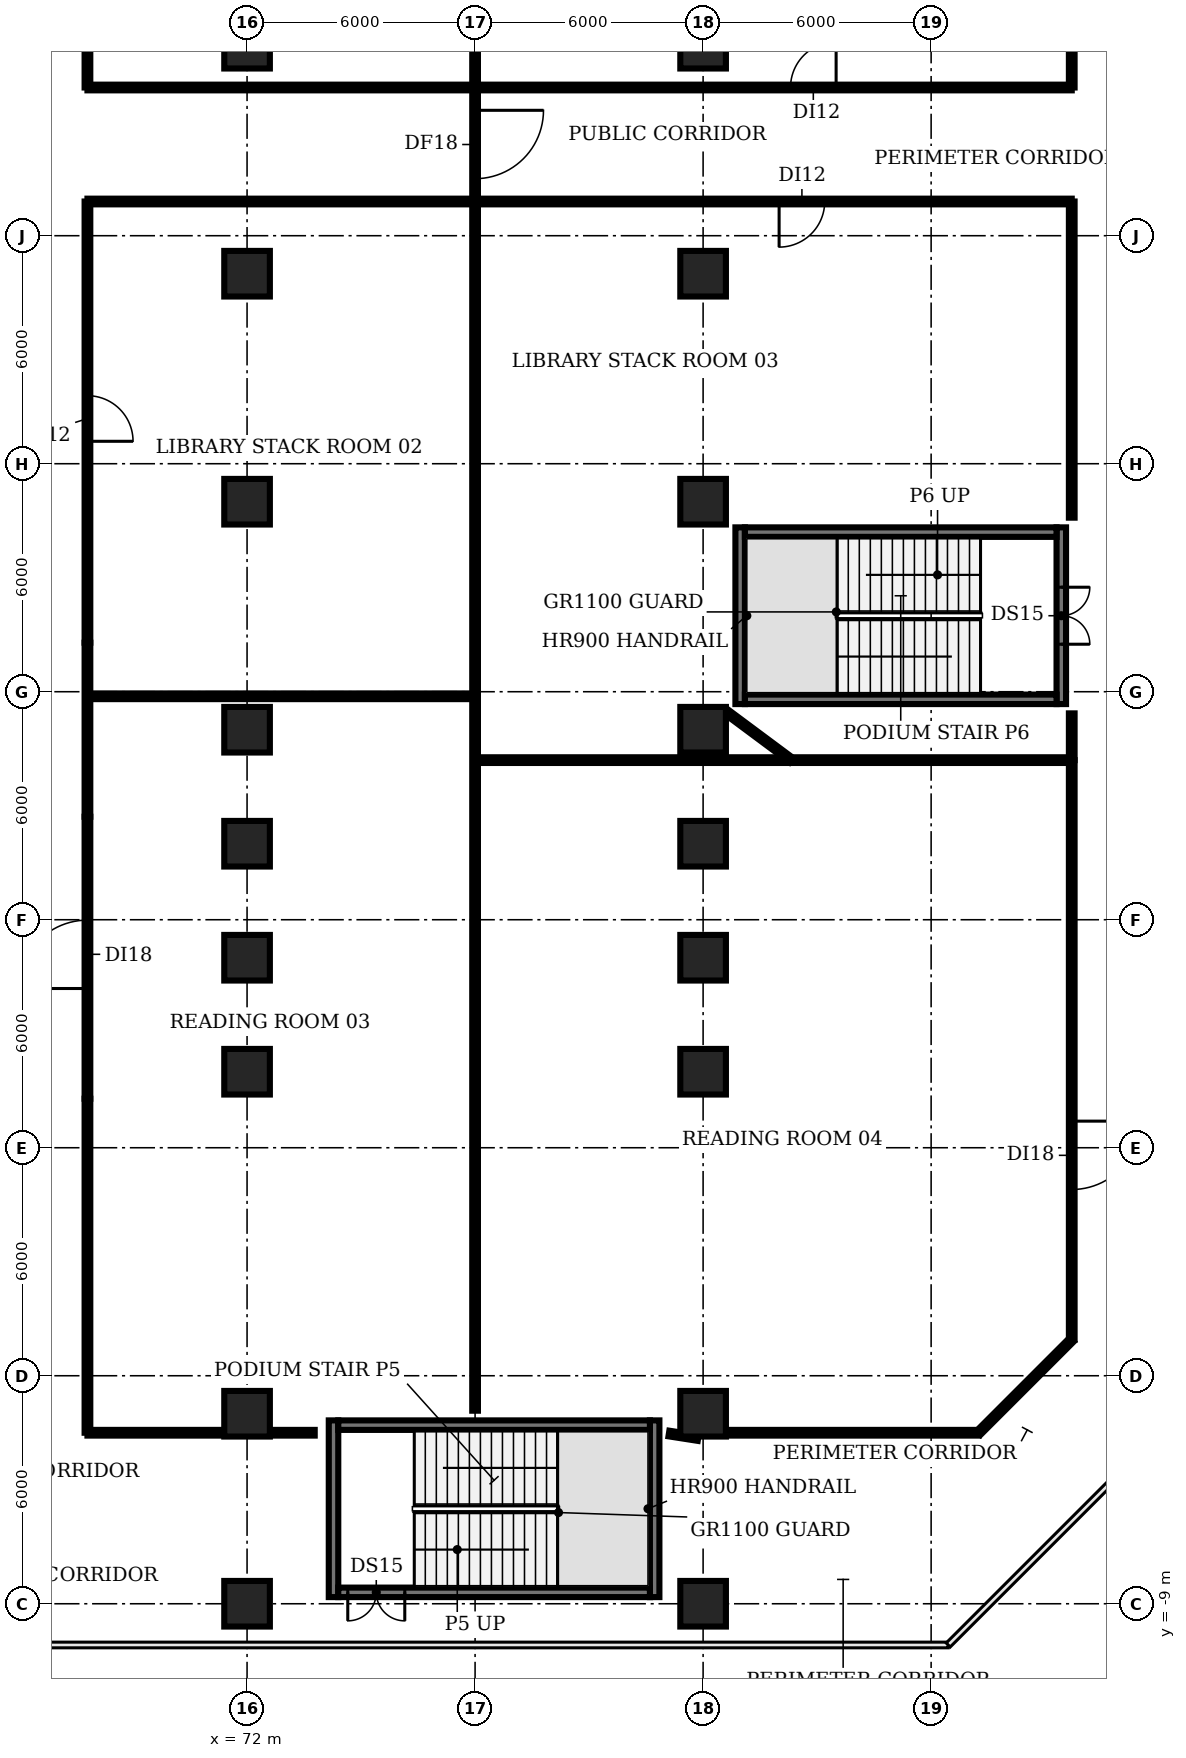
"""IFC4 building model, lengths in metres.
Left out: names, types, materials, properties, quantities, classifications, styles, units other than length and angle.
Written with IfcOpenShell. Run it as: python <this file> out.ifc"""

import sys

from ifc_helpers import new_model, si_unit, direction, frame, frame_2d, origin, origin_2d, place, context, subcontext, project, spatial, rectangle, extrude, element, fill, save


model = new_model("IFC4")
c1 = context("Model", 3, precision=1e-05, world=origin(), true_north=direction((0.0, 1.0)))
c2 = subcontext(c1, "Body", "Model", "MODEL_VIEW")
j1 = project(units=[si_unit("LENGTHUNIT", "METRE"), si_unit("PLANEANGLEUNIT", "RADIAN")], contexts=[c1])
p1 = place(None, origin())
s1 = spatial("IfcSite", under=j1, at=p1, CompositionType="ELEMENT")
p2 = place(p1, origin())
s2 = spatial("IfcBuilding", under=s1, at=p2, CompositionType="ELEMENT")
p3 = place(p2, frame((0.0, 0.0, 6.0)))
s3 = spatial("IfcBuildingStorey", under=s2, at=p3, CompositionType="ELEMENT", Elevation=6.0)
for number, where, z_axis, x_axis in (
    (1, (72.0, -9.0, 0.0), (0.0, 0.0, 1.0), (1.0, 0.0, 0.0)),
    (2, (72.0, -4.0, 0.0), (0.0, 0.0, 1.0), (1.0, 0.0, 0.0)),
    (3, (72.0, 5.0, 0.0), (0.0, 0.0, 1.0), (1.0, 0.0, 0.0)),
    (4, (72.0, 8.0, 0.0), (0.0, 0.0, 1.0), (1.0, 0.0, 0.0)),
    (5, (72.0, 11.0, 0.0), (0.0, 0.0, 1.0), (1.0, 0.0, 0.0)),
    (6, (72.0, 14.0, 0.0), (0.0, 0.0, 1.0), (1.0, 0.0, 0.0)),
    (7, (72.0, 20.0, 0.0), (0.0, 0.0, 1.0), (1.0, 0.0, 0.0)),
    (8, (72.0, 26.0, 0.0), (0.0, 0.0, 1.0), (1.0, 0.0, 0.0)),
    (9, (72.0, 32.0, 0.0), (0.0, 0.0, 1.0), (1.0, 0.0, 0.0)),
    (10, (84.0, -9.0, 0.0), (0.0, 0.0, 1.0), (1.0, 0.0, 0.0)),
    (11, (84.0, -4.0, 0.0), (0.0, 0.0, 1.0), (1.0, 0.0, 0.0)),
    (12, (84.0, 5.0, 0.0), (0.0, 0.0, 1.0), (1.0, 0.0, 0.0)),
    (13, (84.0, 8.0, 0.0), (0.0, 0.0, 1.0), (1.0, 0.0, 0.0)),
    (14, (84.0, 11.0, 0.0), (0.0, 0.0, 1.0), (1.0, 0.0, 0.0)),
    (15, (84.0, 14.0, 0.0), (0.0, 0.0, 1.0), (1.0, 0.0, 0.0)),
    (16, (84.0, 20.0, 0.0), (0.0, 0.0, 1.0), (1.0, 0.0, 0.0)),
    (17, (84.0, 26.0, 0.0), (0.0, 0.0, 1.0), (1.0, 0.0, 0.0)),
    (18, (84.0, 32.0, 0.0), (0.0, 0.0, 1.0), (1.0, 0.0, 0.0)),
):
    element("IfcColumn", number, at=place(p3, frame(where, z_axis=z_axis, x_axis=x_axis)), inside=s3, PredefinedType="COLUMN", context=c2, shape_type="SweptSolid", body=[
        extrude(rectangle(XDim=1.2, YDim=1.2, at=origin_2d()), origin(), (0.0, 0.0, 1.0), 4.6),
    ])
for number, where, z_axis, x_axis in (
    (19, (74.275, -8.825, 0.0), (0.0, 0.0, 1.0), (0.0, 1.0, 0.0)),
    (20, (82.725, -8.825, 0.0), (0.0, 0.0, 1.0), (0.0, 1.0, 0.0)),
):
    element("IfcWall", number, at=place(p3, frame(where, z_axis=z_axis, x_axis=x_axis)), inside=s3, PredefinedType="SHEAR", context=c2, shape_type="SweptSolid", body=[
        extrude(rectangle(XDim=4.65, YDim=0.25, at=frame_2d((2.325, 0.0))), origin(), (0.0, 0.0, 1.0), 4.6),
    ])
p4 = place(p3, frame((82.6, -8.7, 0.0), z_axis=(0.0, 0.0, 1.0), x_axis=(-1.0, 0.0, 0.0)))
e21 = element("IfcWall", 21, at=p4, inside=s3, PredefinedType="SHEAR", context=c2, shape_type="SweptSolid", body=[
    extrude(rectangle(XDim=8.2, YDim=0.25, at=frame_2d((4.1, 0.0))), origin(), (0.0, 0.0, 1.0), 4.6),
])
p5 = place(p4, frame((6.45, 0.0, 0.0)))
e22 = element("IfcOpeningElement", 22, at=p5, cuts=e21, PredefinedType="OPENING", context=c2, shape_type="SweptSolid", body=[
    extrude(rectangle(XDim=1.5, YDim=2.1, at=frame_2d((0.75, 1.05))), frame((0.0, 0.135, 0.0), z_axis=(0.0, -1.0, 0.0), x_axis=(1.0, 0.0, 0.0)), (0.0, 0.0, 1.0), 0.27),
])
p6 = place(p3, frame((74.4, -4.3, 0.0), z_axis=(0.0, 0.0, 1.0), x_axis=(1.0, 0.0, 0.0)))
e23 = element("IfcWall", 23, at=p6, inside=s3, PredefinedType="SHEAR", context=c2, shape_type="SweptSolid", body=[
    extrude(rectangle(XDim=8.2, YDim=0.25, at=frame_2d((4.1, 0.0))), origin(), (0.0, 0.0, 1.0), 4.6),
])
p7 = place(p3, frame((84.975, 14.675, 0.0), z_axis=(0.0, 0.0, 1.0), x_axis=(0.0, 1.0, 0.0)))
e24 = element("IfcWall", 24, at=p7, inside=s3, PredefinedType="SHEAR", context=c2, shape_type="SweptSolid", body=[
    extrude(rectangle(XDim=4.65, YDim=0.25, at=frame_2d((2.325, 0.0))), origin(), (0.0, 0.0, 1.0), 4.6),
])
p8 = place(p3, frame((93.425, 19.325, 0.0), z_axis=(0.0, 0.0, 1.0), x_axis=(0.0, -1.0, 0.0)))
e25 = element("IfcWall", 25, at=p8, inside=s3, PredefinedType="SHEAR", context=c2, shape_type="SweptSolid", body=[
    extrude(rectangle(XDim=4.65, YDim=0.25, at=frame_2d((2.325, 0.0))), origin(), (0.0, 0.0, 1.0), 4.6),
])
p9 = place(p8, frame((1.575, 0.0, 0.0)))
e26 = element("IfcOpeningElement", 26, at=p9, cuts=e25, PredefinedType="OPENING", context=c2, shape_type="SweptSolid", body=[
    extrude(rectangle(XDim=1.5, YDim=2.1, at=frame_2d((0.75, 1.05))), frame((0.0, 0.135, 0.0), z_axis=(0.0, -1.0, 0.0), x_axis=(1.0, 0.0, 0.0)), (0.0, 0.0, 1.0), 0.27),
])
for number, where, z_axis, x_axis in (
    (27, (85.1, 14.8, 0.0), (0.0, 0.0, 1.0), (1.0, 0.0, 0.0)),
    (28, (85.1, 19.2, 0.0), (0.0, 0.0, 1.0), (1.0, 0.0, 0.0)),
):
    element("IfcWall", number, at=place(p3, frame(where, z_axis=z_axis, x_axis=x_axis)), inside=s3, PredefinedType="SHEAR", context=c2, shape_type="SweptSolid", body=[
        extrude(rectangle(XDim=8.2, YDim=0.25, at=frame_2d((4.1, 0.0))), origin(), (0.0, 0.0, 1.0), 4.6),
    ])
p10 = place(p3, frame((67.8, -4.5, 0.0), z_axis=(0.0, 0.0, 1.0), x_axis=(0.0, 1.0, 0.0)))
e29 = element("IfcWall", 29, at=p10, inside=s3, PredefinedType="PARTITIONING", context=c2, shape_type="SweptSolid", body=[
    extrude(rectangle(XDim=8.79, YDim=0.15, at=frame_2d((4.395, 0.0))), origin(), (0.0, 0.0, 1.0), 3.18),
])
p11 = place(p3, frame((67.8, -4.5, 0.0), z_axis=(0.0, 0.0, 1.0), x_axis=(1.0, 0.0, 0.0)))
e30 = element("IfcWall", 30, at=p11, inside=s3, PredefinedType="PARTITIONING", context=c2, shape_type="SweptSolid", body=[
    extrude(rectangle(XDim=3.74, YDim=0.15, at=frame_2d((1.87, 0.0))), origin(), (0.0, 0.0, 1.0), 3.18),
])
p12 = place(p3, frame((67.8, 4.29, 0.0), z_axis=(0.0, 0.0, 1.0), x_axis=(0.0, 1.0, 0.0)))
e31 = element("IfcWall", 31, at=p12, inside=s3, PredefinedType="PARTITIONING", context=c2, shape_type="SweptSolid", body=[
    extrude(rectangle(XDim=7.42, YDim=0.15, at=frame_2d((3.71, 0.0))), origin(), (0.0, 0.0, 1.0), 3.18),
])
p13 = place(p12, frame((2.9, 0.0, 0.0)))
e32 = element("IfcOpeningElement", 32, at=p13, cuts=e31, PredefinedType="OPENING", context=c2, shape_type="SweptSolid", body=[
    extrude(rectangle(XDim=1.8, YDim=2.1, at=frame_2d((0.9, 1.05))), frame((0.0, 0.085, 0.0), z_axis=(0.0, -1.0, 0.0), x_axis=(1.0, 0.0, 0.0)), (0.0, 0.0, 1.0), 0.17),
])
p14 = place(p3, frame((67.8, 11.71, 0.0), z_axis=(0.0, 0.0, 1.0), x_axis=(0.0, 1.0, 0.0)))
e33 = element("IfcWall", 33, at=p14, inside=s3, PredefinedType="PARTITIONING", context=c2, shape_type="SweptSolid", body=[
    extrude(rectangle(XDim=4.58, YDim=0.15, at=frame_2d((2.29, 0.0))), origin(), (0.0, 0.0, 1.0), 3.18),
])
p15 = place(p3, frame((67.8, 14.88, 0.0), z_axis=(0.0, 0.0, 1.0), x_axis=(1.0, 0.0, 0.0)))
e34 = element("IfcWall", 34, at=p15, inside=s3, PredefinedType="PARTITIONING", context=c2, shape_type="SweptSolid", body=[
    extrude(rectangle(XDim=10.2, YDim=0.15, at=frame_2d((5.1, 0.0))), origin(), (0.0, 0.0, 1.0), 3.18),
])
p16 = place(p3, frame((67.8, 27.9, 0.0), z_axis=(0.0, 0.0, 1.0), x_axis=(0.0, -1.0, 0.0)))
e35 = element("IfcWall", 35, at=p16, inside=s3, PredefinedType="PARTITIONING", context=c2, shape_type="SweptSolid", body=[
    extrude(rectangle(XDim=11.61, YDim=0.15, at=frame_2d((5.805, 0.0))), origin(), (0.0, 0.0, 1.0), 3.18),
])
p17 = place(p16, frame((5.11, 0.0, 0.0)))
e36 = element("IfcOpeningElement", 36, at=p17, cuts=e35, PredefinedType="OPENING", context=c2, shape_type="SweptSolid", body=[
    extrude(rectangle(XDim=1.2, YDim=2.1, at=frame_2d((0.6, 1.05))), frame((0.0, 0.085, 0.0), z_axis=(0.0, -1.0, 0.0), x_axis=(1.0, 0.0, 0.0)), (0.0, 0.0, 1.0), 0.17),
])
p18 = place(p3, frame((67.8, 27.9, 0.0), z_axis=(0.0, 0.0, 1.0), x_axis=(1.0, 0.0, 0.0)))
e37 = element("IfcWall", 37, at=p18, inside=s3, PredefinedType="PARTITIONING", context=c2, shape_type="SweptSolid", body=[
    extrude(rectangle(XDim=10.2, YDim=0.15, at=frame_2d((5.1, 0.0))), origin(), (0.0, 0.0, 1.0), 3.18),
])
p19 = place(p3, frame((67.8, 30.9, 0.0), z_axis=(0.0, 0.0, 1.0), x_axis=(0.0, 1.0, 0.0)))
e38 = element("IfcWall", 38, at=p19, inside=s3, PredefinedType="PARTITIONING", context=c2, shape_type="SweptSolid", body=[
    extrude(rectangle(XDim=23.87, YDim=0.15, at=frame_2d((11.935, 0.0))), origin(), (0.0, 0.0, 1.0), 3.18),
])
p20 = place(p19, frame((11.0, 0.0, 0.0)))
e39 = element("IfcOpeningElement", 39, at=p20, cuts=e38, PredefinedType="OPENING", context=c2, shape_type="SweptSolid", body=[
    extrude(rectangle(XDim=1.8, YDim=2.1, at=frame_2d((0.9, 1.05))), frame((0.0, 0.085, 0.0), z_axis=(0.0, -1.0, 0.0), x_axis=(1.0, 0.0, 0.0)), (0.0, 0.0, 1.0), 0.17),
])
p21 = place(p3, frame((67.8, 30.9, 0.0), z_axis=(0.0, 0.0, 1.0), x_axis=(1.0, 0.0, 0.0)))
e40 = element("IfcWall", 40, at=p21, inside=s3, PredefinedType="PARTITIONING", context=c2, shape_type="SweptSolid", body=[
    extrude(rectangle(XDim=10.2, YDim=0.15, at=frame_2d((5.1, 0.0))), origin(), (0.0, 0.0, 1.0), 3.18),
])
p22 = place(p3, frame((72.46, -4.5, 0.0), z_axis=(0.0, 0.0, 1.0), x_axis=(1.0, 0.0, 0.0)))
e41 = element("IfcWall", 41, at=p22, inside=s3, PredefinedType="PARTITIONING", context=c2, shape_type="SweptSolid", body=[
    extrude(rectangle(XDim=1.32, YDim=0.15, at=frame_2d((0.66, 0.0))), origin(), (0.0, 0.0, 1.0), 3.18),
])
p23 = place(p3, frame((78.0, -3.92, 0.0), z_axis=(0.0, 0.0, 1.0), x_axis=(0.0, 1.0, 0.0)))
e42 = element("IfcWall", 42, at=p23, inside=s3, PredefinedType="PARTITIONING", context=c2, shape_type="SweptSolid", body=[
    extrude(rectangle(XDim=31.82, YDim=0.15, at=frame_2d((15.91, 0.0))), origin(), (0.0, 0.0, 1.0), 3.18),
])
p24 = place(p3, frame((78.0, 13.2, 0.0), z_axis=(0.0, 0.0, 1.0), x_axis=(1.0, 0.0, 0.0)))
e43 = element("IfcWall", 43, at=p24, inside=s3, PredefinedType="PARTITIONING", context=c2, shape_type="SweptSolid", body=[
    extrude(rectangle(XDim=15.7, YDim=0.15, at=frame_2d((7.85, 0.0))), origin(), (0.0, 0.0, 1.0), 3.18),
])
p25 = place(p3, frame((78.0, 30.9, 0.0), z_axis=(0.0, 0.0, 1.0), x_axis=(0.0, -1.0, 0.0)))
e44 = element("IfcWall", 44, at=p25, inside=s3, PredefinedType="PARTITIONING", context=c2, shape_type="SweptSolid", body=[
    extrude(rectangle(XDim=3.0, YDim=0.15, at=frame_2d((1.5, 0.0))), origin(), (0.0, 0.0, 1.0), 3.18),
])
p26 = place(p25, frame((0.6, 0.0, 0.0)))
e45 = element("IfcOpeningElement", 45, at=p26, cuts=e44, PredefinedType="OPENING", context=c2, shape_type="SweptSolid", body=[
    extrude(rectangle(XDim=1.8, YDim=2.1, at=frame_2d((0.9, 1.05))), frame((0.0, 0.085, 0.0), z_axis=(0.0, -1.0, 0.0), x_axis=(1.0, 0.0, 0.0)), (0.0, 0.0, 1.0), 0.17),
])
p27 = place(p3, frame((78.0, 30.9, 0.0), z_axis=(0.0, 0.0, 1.0), x_axis=(0.0, 1.0, 0.0)))
e46 = element("IfcWall", 46, at=p27, inside=s3, PredefinedType="PARTITIONING", context=c2, shape_type="SweptSolid", body=[
    extrude(rectangle(XDim=35.8, YDim=0.15, at=frame_2d((17.9, 0.0))), origin(), (0.0, 0.0, 1.0), 3.18),
])
p28 = place(p3, frame((78.0, 30.9, 0.0), z_axis=(0.0, 0.0, 1.0), x_axis=(1.0, 0.0, 0.0)))
e47 = element("IfcWall", 47, at=p28, inside=s3, PredefinedType="PARTITIONING", context=c2, shape_type="SweptSolid", body=[
    extrude(rectangle(XDim=15.7, YDim=0.15, at=frame_2d((7.85, 0.0))), origin(), (0.0, 0.0, 1.0), 3.18),
])
p29 = place(p28, frame((8.3, 0.0, 0.0)))
e48 = element("IfcOpeningElement", 48, at=p29, cuts=e47, PredefinedType="OPENING", context=c2, shape_type="SweptSolid", body=[
    extrude(rectangle(XDim=1.2, YDim=2.1, at=frame_2d((0.6, 1.05))), frame((0.0, 0.085, 0.0), z_axis=(0.0, -1.0, 0.0), x_axis=(1.0, 0.0, 0.0)), (0.0, 0.0, 1.0), 0.17),
])
p30 = place(p3, frame((83.1, -4.52, 0.0), z_axis=(0.0, 0.0, 1.0), x_axis=(0.988098486873, -0.153822560892, 0.0)))
e49 = element("IfcWall", 49, at=p30, inside=s3, PredefinedType="PARTITIONING", context=c2, shape_type="SweptSolid", body=[
    extrude(rectangle(XDim=0.779, YDim=0.15, at=frame_2d((0.39, 0.0))), origin(), (0.0, 0.0, 1.0), 3.18),
])
p31 = place(p3, frame((84.46, -4.5, 0.0), z_axis=(0.0, 0.0, 1.0), x_axis=(1.0, 0.0, 0.0)))
e50 = element("IfcWall", 50, at=p31, inside=s3, PredefinedType="PARTITIONING", context=c2, shape_type="SweptSolid", body=[
    extrude(rectangle(XDim=6.79, YDim=0.15, at=frame_2d((3.395, 0.0))), origin(), (0.0, 0.0, 1.0), 3.18),
])
p32 = place(p3, frame((84.64, 14.45, 0.0), z_axis=(0.0, 0.0, 1.0), x_axis=(0.802316318144, -0.596899091673, 0.0)))
e51 = element("IfcWall", 51, at=p32, inside=s3, PredefinedType="PARTITIONING", context=c2, shape_type="SweptSolid", body=[
    extrude(rectangle(XDim=2.094, YDim=0.15, at=frame_2d((1.047, 0.0))), origin(), (0.0, 0.0, 1.0), 3.18),
])
p33 = place(p3, frame((91.25, -4.5, 0.0), z_axis=(0.0, 0.0, 1.0), x_axis=(0.707106781187, 0.707106781187, 0.0)))
e52 = element("IfcWall", 52, at=p33, inside=s3, PredefinedType="PARTITIONING", context=c2, shape_type="SweptSolid", body=[
    extrude(rectangle(XDim=3.465, YDim=0.15, at=frame_2d((1.732, 0.0))), origin(), (0.0, 0.0, 1.0), 3.18),
])
p34 = place(p3, frame((93.7, 13.2, 0.0), z_axis=(0.0, 0.0, 1.0), x_axis=(0.0, -1.0, 0.0)))
e53 = element("IfcWall", 53, at=p34, inside=s3, PredefinedType="PARTITIONING", context=c2, shape_type="SweptSolid", body=[
    extrude(rectangle(XDim=15.25, YDim=0.15, at=frame_2d((7.625, 0.0))), origin(), (0.0, 0.0, 1.0), 3.18),
])
p35 = place(p34, frame((9.5, 0.0, 0.0)))
e54 = element("IfcOpeningElement", 54, at=p35, cuts=e53, PredefinedType="OPENING", context=c2, shape_type="SweptSolid", body=[
    extrude(rectangle(XDim=1.8, YDim=2.1, at=frame_2d((0.9, 1.05))), frame((0.0, 0.085, 0.0), z_axis=(0.0, -1.0, 0.0), x_axis=(1.0, 0.0, 0.0)), (0.0, 0.0, 1.0), 0.17),
])
p36 = place(p3, frame((93.7, 13.2, 0.0), z_axis=(0.0, 0.0, 1.0), x_axis=(0.0, 1.0, 0.0)))
e55 = element("IfcWall", 55, at=p36, inside=s3, PredefinedType="PARTITIONING", context=c2, shape_type="SweptSolid", body=[
    extrude(rectangle(XDim=1.23, YDim=0.15, at=frame_2d((0.615, 0.0))), origin(), (0.0, 0.0, 1.0), 3.18),
])
p37 = place(p3, frame((93.7, 19.58, 0.0), z_axis=(0.0, 0.0, 1.0), x_axis=(0.0, 1.0, 0.0)))
e56 = element("IfcWall", 56, at=p37, inside=s3, PredefinedType="PARTITIONING", context=c2, shape_type="SweptSolid", body=[
    extrude(rectangle(XDim=8.32, YDim=0.15, at=frame_2d((4.16, 0.0))), origin(), (0.0, 0.0, 1.0), 3.18),
])
p38 = place(p3, frame((93.7, 27.9, 0.0), z_axis=(0.0, 0.0, 1.0), x_axis=(-1.0, 0.0, 0.0)))
e57 = element("IfcWall", 57, at=p38, inside=s3, PredefinedType="PARTITIONING", context=c2, shape_type="SweptSolid", body=[
    extrude(rectangle(XDim=15.7, YDim=0.15, at=frame_2d((7.85, 0.0))), origin(), (0.0, 0.0, 1.0), 3.18),
])
p39 = place(p38, frame((6.5, 0.0, 0.0)))
e58 = element("IfcOpeningElement", 58, at=p39, cuts=e57, PredefinedType="OPENING", context=c2, shape_type="SweptSolid", body=[
    extrude(rectangle(XDim=1.2, YDim=2.1, at=frame_2d((0.6, 1.05))), frame((0.0, 0.085, 0.0), z_axis=(0.0, -1.0, 0.0), x_axis=(1.0, 0.0, 0.0)), (0.0, 0.0, 1.0), 0.17),
])
p40 = place(p3, frame((93.7, 30.9, 0.0), z_axis=(0.0, 0.0, 1.0), x_axis=(0.0, 1.0, 0.0)))
e59 = element("IfcWall", 59, at=p40, inside=s3, PredefinedType="PARTITIONING", context=c2, shape_type="SweptSolid", body=[
    extrude(rectangle(XDim=7.52, YDim=0.15, at=frame_2d((3.76, 0.0))), origin(), (0.0, 0.0, 1.0), 3.18),
])
p41 = place(p5, origin())
e60 = element("IfcDoor", 60, at=p41, inside=s3, OperationType="DOUBLE_DOOR_SINGLE_SWING", PredefinedType="DOOR", context=c2, shape_type="SweptSolid", body=[
    extrude(rectangle(XDim=1.5, YDim=2.1, at=frame_2d((0.75, 1.05))), frame((0.0, 0.025, 0.0), z_axis=(0.0, -1.0, 0.0), x_axis=(1.0, 0.0, 0.0)), (0.0, 0.0, 1.0), 0.05),
])
fill(e22, e60)
p42 = place(p9, origin())
e61 = element("IfcDoor", 61, at=p42, inside=s3, OperationType="DOUBLE_DOOR_SINGLE_SWING", PredefinedType="DOOR", context=c2, shape_type="SweptSolid", body=[
    extrude(rectangle(XDim=1.5, YDim=2.1, at=frame_2d((0.75, 1.05))), frame((0.0, 0.025, 0.0), z_axis=(0.0, -1.0, 0.0), x_axis=(1.0, 0.0, 0.0)), (0.0, 0.0, 1.0), 0.05),
])
fill(e26, e61)
p43 = place(p13, origin())
e62 = element("IfcDoor", 62, at=p43, inside=s3, OperationType="SINGLE_SWING_LEFT", PredefinedType="DOOR", context=c2, shape_type="SweptSolid", body=[
    extrude(rectangle(XDim=1.8, YDim=2.1, at=frame_2d((0.9, 1.05))), frame((0.0, 0.025, 0.0), z_axis=(0.0, -1.0, 0.0), x_axis=(1.0, 0.0, 0.0)), (0.0, 0.0, 1.0), 0.05),
])
fill(e32, e62)
p44 = place(p17, origin())
e63 = element("IfcDoor", 63, at=p44, inside=s3, OperationType="SINGLE_SWING_RIGHT", PredefinedType="DOOR", context=c2, shape_type="SweptSolid", body=[
    extrude(rectangle(XDim=1.2, YDim=2.1, at=frame_2d((0.6, 1.05))), frame((0.0, 0.025, 0.0), z_axis=(0.0, -1.0, 0.0), x_axis=(1.0, 0.0, 0.0)), (0.0, 0.0, 1.0), 0.05),
])
fill(e36, e63)
p45 = place(p26, origin())
e64 = element("IfcDoor", 64, at=p45, inside=s3, OperationType="SINGLE_SWING_LEFT", PredefinedType="DOOR", context=c2, shape_type="SweptSolid", body=[
    extrude(rectangle(XDim=1.8, YDim=2.1, at=frame_2d((0.9, 1.05))), frame((0.0, 0.025, 0.0), z_axis=(0.0, -1.0, 0.0), x_axis=(1.0, 0.0, 0.0)), (0.0, 0.0, 1.0), 0.05),
])
fill(e45, e64)
p46 = place(p29, origin())
e65 = element("IfcDoor", 65, at=p46, inside=s3, OperationType="SINGLE_SWING_RIGHT", PredefinedType="DOOR", context=c2, shape_type="SweptSolid", body=[
    extrude(rectangle(XDim=1.2, YDim=2.1, at=frame_2d((0.6, 1.05))), frame((0.0, 0.025, 0.0), z_axis=(0.0, -1.0, 0.0), x_axis=(1.0, 0.0, 0.0)), (0.0, 0.0, 1.0), 0.05),
])
fill(e48, e65)
p47 = place(p35, origin())
e66 = element("IfcDoor", 66, at=p47, inside=s3, OperationType="SINGLE_SWING_LEFT", PredefinedType="DOOR", context=c2, shape_type="SweptSolid", body=[
    extrude(rectangle(XDim=1.8, YDim=2.1, at=frame_2d((0.9, 1.05))), frame((0.0, 0.025, 0.0), z_axis=(0.0, -1.0, 0.0), x_axis=(1.0, 0.0, 0.0)), (0.0, 0.0, 1.0), 0.05),
])
fill(e54, e66)
p48 = place(p39, origin())
e67 = element("IfcDoor", 67, at=p48, inside=s3, OperationType="SINGLE_SWING_RIGHT", PredefinedType="DOOR", context=c2, shape_type="SweptSolid", body=[
    extrude(rectangle(XDim=1.2, YDim=2.1, at=frame_2d((0.6, 1.05))), frame((0.0, 0.025, 0.0), z_axis=(0.0, -1.0, 0.0), x_axis=(1.0, 0.0, 0.0)), (0.0, 0.0, 1.0), 0.05),
])
fill(e58, e67)
save(model, sys.argv[1])
